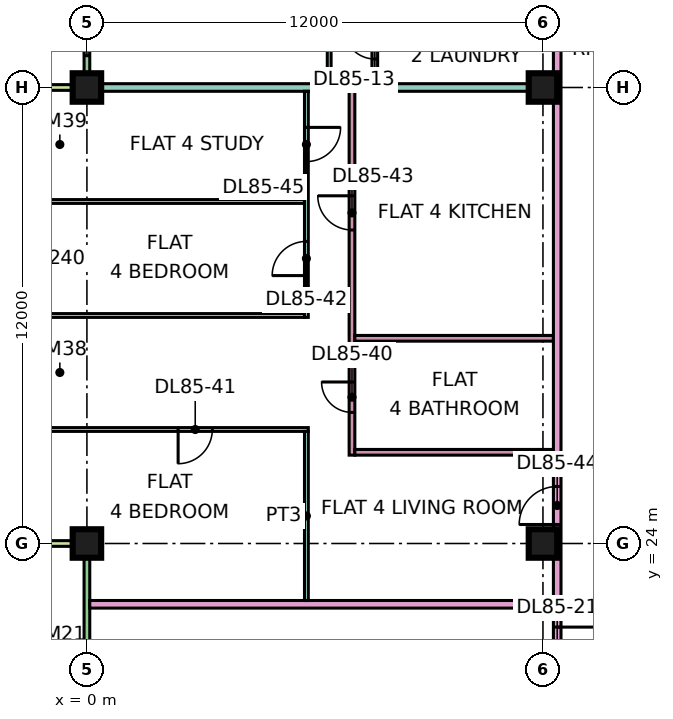
"""IFC4 building model, lengths in metres.
Left out: names, types, materials, properties, quantities, classifications, styles, units other than length and angle.
Written with IfcOpenShell. Run it as: python <this file> out.ifc"""

import sys

from ifc_helpers import new_model, si_unit, direction, frame, frame_2d, origin, origin_2d, place, context, subcontext, project, spatial, rectangle, extrude, element, fill, save


model = new_model("IFC4")
c1 = context("Model", 3, precision=1e-05, world=origin(), true_north=direction((0.0, 1.0)))
c2 = subcontext(c1, "Body", "Model", "MODEL_VIEW")
j1 = project(units=[si_unit("LENGTHUNIT", "METRE"), si_unit("PLANEANGLEUNIT", "RADIAN")], contexts=[c1])
p1 = place(None, origin())
s1 = spatial("IfcSite", under=j1, at=p1, CompositionType="ELEMENT")
p2 = place(p1, origin())
s2 = spatial("IfcBuilding", under=s1, at=p2, CompositionType="ELEMENT")
p3 = place(p2, frame((0.0, 0.0, 365.15)))
s3 = spatial("IfcBuildingStorey", under=s2, at=p3, CompositionType="ELEMENT", Elevation=365.15)
p4 = place(p3, frame((0.0, 24.0, 0.0), z_axis=(0.0, 0.0, 1.0), x_axis=(1.0, 0.0, 0.0)))
e1 = element("IfcColumn", 1, at=p4, inside=s3, PredefinedType="COLUMN", context=c2, shape_type="SweptSolid", body=[
    extrude(rectangle(XDim=0.75, YDim=0.75, at=origin_2d()), origin(), (0.0, 0.0, 1.0), 3.75),
])
p5 = place(p3, frame((0.0, 36.0, 0.0), z_axis=(0.0, 0.0, 1.0), x_axis=(1.0, 0.0, 0.0)))
e2 = element("IfcColumn", 2, at=p5, inside=s3, PredefinedType="COLUMN", context=c2, shape_type="SweptSolid", body=[
    extrude(rectangle(XDim=0.75, YDim=0.75, at=origin_2d()), origin(), (0.0, 0.0, 1.0), 3.75),
])
for number, where, z_axis, x_axis in (
    (3, (12.0, 24.0, 0.0), (0.0, 0.0, 1.0), (1.0, 0.0, 0.0)),
    (4, (12.0, 36.0, 0.0), (0.0, 0.0, 1.0), (1.0, 0.0, 0.0)),
):
    element("IfcColumn", number, at=place(p3, frame(where, z_axis=z_axis, x_axis=x_axis)), inside=s3, PredefinedType="COLUMN", context=c2, shape_type="SweptSolid", body=[
        extrude(rectangle(XDim=0.75, YDim=0.75, at=origin_2d()), origin(), (0.0, 0.0, 1.0), 3.75),
    ])
p6 = place(p3, frame((0.0, 47.925, 0.0), z_axis=(0.0, 0.0, 1.0), x_axis=(0.0, -1.0, 0.0)))
e5 = element("IfcWall", 5, at=p6, inside=s3, PredefinedType="SOLIDWALL", context=c2, shape_type="SweptSolid", body=[
    extrude(rectangle(XDim=11.85, YDim=0.15, at=frame_2d((5.925, 0.0))), origin(), (0.0, 0.0, 1.0), 3.35),
])
p7 = place(p6, frame((0.625, 0.0, 0.0)))
e6 = element("IfcOpeningElement", 6, at=p7, cuts=e5, PredefinedType="OPENING", context=c2, shape_type="SweptSolid", body=[
    extrude(rectangle(XDim=1.2, YDim=2.4, at=frame_2d((0.6, 1.2))), frame((0.0, 0.085, 0.0), z_axis=(0.0, -1.0, 0.0), x_axis=(1.0, 0.0, 0.0)), (0.0, 0.0, 1.0), 0.17),
])
p8 = place(p6, frame((4.663, 0.0, 0.45)))
e7 = element("IfcOpeningElement", 7, at=p8, cuts=e5, PredefinedType="OPENING", context=c2, shape_type="SweptSolid", body=[
    extrude(rectangle(XDim=3.0, YDim=2.4, at=frame_2d((1.5, 1.2))), frame((0.0, 0.085, 0.0), z_axis=(0.0, -1.0, 0.0), x_axis=(1.0, 0.0, 0.0)), (0.0, 0.0, 1.0), 0.17),
])
p9 = place(p6, frame((9.288, 0.0, 0.45)))
e8 = element("IfcOpeningElement", 8, at=p9, cuts=e5, PredefinedType="OPENING", context=c2, shape_type="SweptSolid", body=[
    extrude(rectangle(XDim=1.8, YDim=2.4, at=frame_2d((0.9, 1.2))), frame((0.0, 0.085, 0.0), z_axis=(0.0, -1.0, 0.0), x_axis=(1.0, 0.0, 0.0)), (0.0, 0.0, 1.0), 0.17),
])
p10 = place(p3, frame((-1.5, 36.0, 0.0), z_axis=(0.0, 0.0, 1.0), x_axis=(1.0, 0.0, 0.0)))
e9 = element("IfcWall", 9, at=p10, inside=s3, PredefinedType="SOLIDWALL", context=c2, shape_type="SweptSolid", body=[
    extrude(rectangle(XDim=1.5, YDim=0.15, at=frame_2d((0.75, 0.0))), origin(), (0.0, 0.0, 1.0), 3.35),
])
p11 = place(p3, frame((0.0, 23.925, 0.0), z_axis=(0.0, 0.0, 1.0), x_axis=(0.0, -1.0, 0.0)))
e10 = element("IfcWall", 10, at=p11, inside=s3, PredefinedType="SOLIDWALL", context=c2, shape_type="SweptSolid", body=[
    extrude(rectangle(XDim=11.35, YDim=0.15, at=frame_2d((5.675, 0.0))), origin(), (0.0, 0.0, 1.0), 3.35),
])
p12 = place(p11, frame((6.738, 0.0, 0.0)))
e11 = element("IfcOpeningElement", 11, at=p12, cuts=e10, PredefinedType="OPENING", context=c2, shape_type="SweptSolid", body=[
    extrude(rectangle(XDim=1.8, YDim=2.4, at=frame_2d((0.9, 1.2))), frame((0.0, 0.085, 0.0), z_axis=(0.0, -1.0, 0.0), x_axis=(1.0, 0.0, 0.0)), (0.0, 0.0, 1.0), 0.17),
])
p13 = place(p3, frame((-1.5, 24.0, 0.0), z_axis=(0.0, 0.0, 1.0), x_axis=(1.0, 0.0, 0.0)))
e12 = element("IfcWall", 12, at=p13, inside=s3, PredefinedType="SOLIDWALL", context=c2, shape_type="SweptSolid", body=[
    extrude(rectangle(XDim=1.5, YDim=0.15, at=frame_2d((0.75, 0.0))), origin(), (0.0, 0.0, 1.0), 3.35),
])
p14 = place(p3, frame((-1.35, 27.0, 0.0), z_axis=(0.0, 0.0, 1.0), x_axis=(1.0, 0.0, 0.0)))
e13 = element("IfcWall", 13, at=p14, inside=s3, PredefinedType="PARTITIONING", context=c2, shape_type="SweptSolid", body=[
    extrude(rectangle(XDim=7.175, YDim=0.1, at=frame_2d((3.587, 0.0))), origin(), (0.0, 0.0, 1.0), 3.35),
])
p15 = place(p14, frame((3.75, 0.0, 0.0)))
e14 = element("IfcOpeningElement", 14, at=p15, cuts=e13, PredefinedType="OPENING", context=c2, shape_type="SweptSolid", body=[
    extrude(rectangle(XDim=0.9, YDim=2.1, at=frame_2d((0.45, 1.05))), frame((0.0, 0.06, 0.0), z_axis=(0.0, -1.0, 0.0), x_axis=(1.0, 0.0, 0.0)), (0.0, 0.0, 1.0), 0.12),
])
for number, where, z_axis, x_axis in (
    (15, (-1.35, 30.0, 0.0), (0.0, 0.0, 1.0), (1.0, 0.0, 0.0)),
    (16, (-1.35, 33.0, 0.0), (0.0, 0.0, 1.0), (1.0, 0.0, 0.0)),
):
    element("IfcWall", number, at=place(p3, frame(where, z_axis=z_axis, x_axis=x_axis)), inside=s3, PredefinedType="PARTITIONING", context=c2, shape_type="SweptSolid", body=[
        extrude(rectangle(XDim=7.075, YDim=0.1, at=frame_2d((3.538, 0.0))), origin(), (0.0, 0.0, 1.0), 3.35),
    ])
e17 = element("IfcWall", 17, at=p5, inside=s3, PredefinedType="PARTITIONING", context=c2, shape_type="SweptSolid", body=[
    extrude(rectangle(XDim=12.275, YDim=0.2, at=frame_2d((6.137, 0.0))), origin(), (0.0, 0.0, 1.0), 3.35),
])
p16 = place(p3, frame((0.074, 22.4, 0.0), z_axis=(0.0, 0.0, 1.0), x_axis=(1.0, 0.0, 0.0)))
e18 = element("IfcWall", 18, at=p16, inside=s3, PredefinedType="PARTITIONING", context=c2, shape_type="SweptSolid", body=[
    extrude(rectangle(XDim=12.201, YDim=0.2, at=frame_2d((6.101, 0.0))), origin(), (0.0, 0.0, 1.0), 3.35),
])
p17 = place(p3, frame((5.775, 22.5, 0.0), z_axis=(0.0, 0.0, 1.0), x_axis=(0.0, 1.0, 0.0)))
e19 = element("IfcWall", 19, at=p17, inside=s3, PredefinedType="PARTITIONING", context=c2, shape_type="SweptSolid", body=[
    extrude(rectangle(XDim=4.45, YDim=0.1, at=frame_2d((2.225, 0.0))), origin(), (0.0, 0.0, 1.0), 3.35),
])
p18 = place(p3, frame((5.775, 29.95, 0.0), z_axis=(0.0, 0.0, 1.0), x_axis=(0.0, 1.0, 0.0)))
e20 = element("IfcWall", 20, at=p18, inside=s3, PredefinedType="PARTITIONING", context=c2, shape_type="SweptSolid", body=[
    extrude(rectangle(XDim=5.95, YDim=0.1, at=frame_2d((2.975, 0.0))), origin(), (0.0, 0.0, 1.0), 3.35),
])
p19 = place(p18, frame((1.1, 0.0, 0.0)))
e21 = element("IfcOpeningElement", 21, at=p19, cuts=e20, PredefinedType="OPENING", context=c2, shape_type="SweptSolid", body=[
    extrude(rectangle(XDim=0.9, YDim=2.1, at=frame_2d((0.45, 1.05))), frame((0.0, 0.06, 0.0), z_axis=(0.0, -1.0, 0.0), x_axis=(1.0, 0.0, 0.0)), (0.0, 0.0, 1.0), 0.12),
])
p20 = place(p18, frame((4.1, 0.0, 0.0)))
e22 = element("IfcOpeningElement", 22, at=p20, cuts=e20, PredefinedType="OPENING", context=c2, shape_type="SweptSolid", body=[
    extrude(rectangle(XDim=0.9, YDim=2.1, at=frame_2d((0.45, 1.05))), frame((0.0, 0.06, 0.0), z_axis=(0.0, -1.0, 0.0), x_axis=(1.0, 0.0, 0.0)), (0.0, 0.0, 1.0), 0.12),
])
p21 = place(p3, frame((6.375, 36.1, 0.0), z_axis=(0.0, 0.0, 1.0), x_axis=(0.0, 1.0, 0.0)))
e23 = element("IfcWall", 23, at=p21, inside=s3, PredefinedType="PARTITIONING", context=c2, shape_type="SweptSolid", body=[
    extrude(rectangle(XDim=2.85, YDim=0.1, at=frame_2d((1.425, 0.0))), origin(), (0.0, 0.0, 1.0), 3.35),
])
p22 = place(p21, frame((0.95, 0.0, 0.0)))
e24 = element("IfcOpeningElement", 24, at=p22, cuts=e23, PredefinedType="OPENING", context=c2, shape_type="SweptSolid", body=[
    extrude(rectangle(XDim=0.9, YDim=2.1, at=frame_2d((0.45, 1.05))), frame((0.0, 0.06, 0.0), z_axis=(0.0, -1.0, 0.0), x_axis=(1.0, 0.0, 0.0)), (0.0, 0.0, 1.0), 0.12),
])
p23 = place(p3, frame((6.975, 26.325, 0.0), z_axis=(0.0, 0.0, 1.0), x_axis=(0.0, 1.0, 0.0)))
e25 = element("IfcWall", 25, at=p23, inside=s3, PredefinedType="PARTITIONING", context=c2, shape_type="SweptSolid", body=[
    extrude(rectangle(XDim=9.575, YDim=0.15, at=frame_2d((4.788, 0.0))), origin(), (0.0, 0.0, 1.0), 3.35),
])
p24 = place(p23, frame((1.125, 0.0, 0.0)))
e26 = element("IfcOpeningElement", 26, at=p24, cuts=e25, PredefinedType="OPENING", context=c2, shape_type="SweptSolid", body=[
    extrude(rectangle(XDim=0.8, YDim=2.1, at=frame_2d((0.4, 1.05))), frame((0.0, 0.085, 0.0), z_axis=(0.0, -1.0, 0.0), x_axis=(1.0, 0.0, 0.0)), (0.0, 0.0, 1.0), 0.17),
])
p25 = place(p23, frame((5.925, 0.0, 0.0)))
e27 = element("IfcOpeningElement", 27, at=p25, cuts=e25, PredefinedType="OPENING", context=c2, shape_type="SweptSolid", body=[
    extrude(rectangle(XDim=0.9, YDim=2.1, at=frame_2d((0.45, 1.05))), frame((0.0, 0.085, 0.0), z_axis=(0.0, -1.0, 0.0), x_axis=(1.0, 0.0, 0.0)), (0.0, 0.0, 1.0), 0.17),
])
for number, where, z_axis, x_axis in (
    (28, (7.05, 26.4, 0.0), (0.0, 0.0, 1.0), (1.0, 0.0, 0.0)),
    (29, (7.05, 29.4, 0.0), (0.0, 0.0, 1.0), (1.0, 0.0, 0.0)),
):
    element("IfcWall", number, at=place(p3, frame(where, z_axis=z_axis, x_axis=x_axis)), inside=s3, PredefinedType="PARTITIONING", context=c2, shape_type="SweptSolid", body=[
        extrude(rectangle(XDim=5.225, YDim=0.15, at=frame_2d((2.612, 0.0))), origin(), (0.0, 0.0, 1.0), 3.35),
    ])
p26 = place(p3, frame((7.575, 36.1, 0.0), z_axis=(0.0, 0.0, 1.0), x_axis=(0.0, 1.0, 0.0)))
e30 = element("IfcWall", 30, at=p26, inside=s3, PredefinedType="PARTITIONING", context=c2, shape_type="SweptSolid", body=[
    extrude(rectangle(XDim=12.575, YDim=0.15, at=frame_2d((6.288, 0.0))), origin(), (0.0, 0.0, 1.0), 3.35),
])
p27 = place(p26, frame((0.65, 0.0, 0.0)))
e31 = element("IfcOpeningElement", 31, at=p27, cuts=e30, PredefinedType="OPENING", context=c2, shape_type="SweptSolid", body=[
    extrude(rectangle(XDim=0.8, YDim=2.1, at=frame_2d((0.4, 1.05))), frame((0.0, 0.085, 0.0), z_axis=(0.0, -1.0, 0.0), x_axis=(1.0, 0.0, 0.0)), (0.0, 0.0, 1.0), 0.17),
])
p28 = place(p26, frame((3.65, 0.0, 0.0)))
e32 = element("IfcOpeningElement", 32, at=p28, cuts=e30, PredefinedType="OPENING", context=c2, shape_type="SweptSolid", body=[
    extrude(rectangle(XDim=0.8, YDim=2.1, at=frame_2d((0.4, 1.05))), frame((0.0, 0.085, 0.0), z_axis=(0.0, -1.0, 0.0), x_axis=(1.0, 0.0, 0.0)), (0.0, 0.0, 1.0), 0.17),
])
p29 = place(p26, frame((7.1, 0.0, 0.0)))
e33 = element("IfcOpeningElement", 33, at=p29, cuts=e30, PredefinedType="OPENING", context=c2, shape_type="SweptSolid", body=[
    extrude(rectangle(XDim=0.8, YDim=2.1, at=frame_2d((0.4, 1.05))), frame((0.0, 0.085, 0.0), z_axis=(0.0, -1.0, 0.0), x_axis=(1.0, 0.0, 0.0)), (0.0, 0.0, 1.0), 0.17),
])
p30 = place(p3, frame((12.375, 20.0, 0.0), z_axis=(0.0, 0.0, 1.0), x_axis=(0.0, 1.0, 0.0)))
e34 = element("IfcWall", 34, at=p30, inside=s3, PredefinedType="PARTITIONING", context=c2, shape_type="SweptSolid", body=[
    extrude(rectangle(XDim=33.926, YDim=0.2, at=frame_2d((16.963, 0.0))), origin(), (0.0, 0.0, 1.0), 3.35),
])
p31 = place(p30, frame((29.4, 0.0, 0.0)))
e35 = element("IfcOpeningElement", 35, at=p31, cuts=e34, PredefinedType="OPENING", context=c2, shape_type="SweptSolid", body=[
    extrude(rectangle(XDim=1.0, YDim=2.1, at=frame_2d((0.5, 1.05))), frame((0.0, 0.11, 0.0), z_axis=(0.0, -1.0, 0.0), x_axis=(1.0, 0.0, 0.0)), (0.0, 0.0, 1.0), 0.22),
])
p32 = place(p30, frame((0.6, 0.0, 0.0)))
e36 = element("IfcOpeningElement", 36, at=p32, cuts=e34, PredefinedType="OPENING", context=c2, shape_type="SweptSolid", body=[
    extrude(rectangle(XDim=1.2, YDim=2.1, at=frame_2d((0.6, 1.05))), frame((0.0, 0.11, 0.0), z_axis=(0.0, -1.0, 0.0), x_axis=(1.0, 0.0, 0.0)), (0.0, 0.0, 1.0), 0.22),
])
p33 = place(p30, frame((4.5, 0.0, 0.0)))
e37 = element("IfcOpeningElement", 37, at=p33, cuts=e34, PredefinedType="OPENING", context=c2, shape_type="SweptSolid", body=[
    extrude(rectangle(XDim=1.0, YDim=2.1, at=frame_2d((0.5, 1.05))), frame((0.0, 0.11, 0.0), z_axis=(0.0, -1.0, 0.0), x_axis=(1.0, 0.0, 0.0)), (0.0, 0.0, 1.0), 0.22),
])
p34 = place(p9, origin())
e38 = element("IfcWindow", 38, at=p34, inside=s3, PartitioningType="SINGLE_PANEL", PredefinedType="WINDOW", context=c2, shape_type="SweptSolid", body=[
    extrude(rectangle(XDim=1.8, YDim=2.4, at=frame_2d((0.9, 1.2))), frame((0.0, 0.03, 0.0), z_axis=(0.0, -1.0, 0.0), x_axis=(1.0, 0.0, 0.0)), (0.0, 0.0, 1.0), 0.06),
])
fill(e8, e38)
p35 = place(p27, frame((0.8, 0.0, 0.0), z_axis=(0.0, 0.0, 1.0), x_axis=(-1.0, 0.0, 0.0)))
e39 = element("IfcDoor", 39, at=p35, inside=s3, OperationType="SINGLE_SWING_RIGHT", PredefinedType="DOOR", context=c2, shape_type="SweptSolid", body=[
    extrude(rectangle(XDim=0.8, YDim=2.1, at=frame_2d((0.4, 1.05))), frame((0.0, 0.025, 0.0), z_axis=(0.0, -1.0, 0.0), x_axis=(1.0, 0.0, 0.0)), (0.0, 0.0, 1.0), 0.05),
])
fill(e31, e39)
p36 = place(p32, origin())
e40 = element("IfcDoor", 40, at=p36, inside=s3, OperationType="SINGLE_SWING_RIGHT", PredefinedType="DOOR", context=c2, shape_type="SweptSolid", body=[
    extrude(rectangle(XDim=1.2, YDim=2.1, at=frame_2d((0.6, 1.05))), frame((0.0, 0.025, 0.0), z_axis=(0.0, -1.0, 0.0), x_axis=(1.0, 0.0, 0.0)), (0.0, 0.0, 1.0), 0.05),
])
fill(e36, e40)
p37 = place(p24, frame((0.8, 0.0, 0.0), z_axis=(0.0, 0.0, 1.0), x_axis=(-1.0, 0.0, 0.0)))
e41 = element("IfcDoor", 41, at=p37, inside=s3, OperationType="SINGLE_SWING_RIGHT", PredefinedType="DOOR", context=c2, shape_type="SweptSolid", body=[
    extrude(rectangle(XDim=0.8, YDim=2.1, at=frame_2d((0.4, 1.05))), frame((0.0, 0.025, 0.0), z_axis=(0.0, -1.0, 0.0), x_axis=(1.0, 0.0, 0.0)), (0.0, 0.0, 1.0), 0.05),
])
fill(e26, e41)
p38 = place(p15, frame((0.9, 0.0, 0.0), z_axis=(0.0, 0.0, 1.0), x_axis=(-1.0, 0.0, 0.0)))
e42 = element("IfcDoor", 42, at=p38, inside=s3, OperationType="SINGLE_SWING_LEFT", PredefinedType="DOOR", context=c2, shape_type="SweptSolid", body=[
    extrude(rectangle(XDim=0.9, YDim=2.1, at=frame_2d((0.45, 1.05))), frame((0.0, 0.025, 0.0), z_axis=(0.0, -1.0, 0.0), x_axis=(1.0, 0.0, 0.0)), (0.0, 0.0, 1.0), 0.05),
])
fill(e14, e42)
p39 = place(p19, origin())
e43 = element("IfcDoor", 43, at=p39, inside=s3, OperationType="SINGLE_SWING_LEFT", PredefinedType="DOOR", context=c2, shape_type="SweptSolid", body=[
    extrude(rectangle(XDim=0.9, YDim=2.1, at=frame_2d((0.45, 1.05))), frame((0.0, 0.025, 0.0), z_axis=(0.0, -1.0, 0.0), x_axis=(1.0, 0.0, 0.0)), (0.0, 0.0, 1.0), 0.05),
])
fill(e21, e43)
p40 = place(p25, frame((0.9, 0.0, 0.0), z_axis=(0.0, 0.0, 1.0), x_axis=(-1.0, 0.0, 0.0)))
e44 = element("IfcDoor", 44, at=p40, inside=s3, OperationType="SINGLE_SWING_RIGHT", PredefinedType="DOOR", context=c2, shape_type="SweptSolid", body=[
    extrude(rectangle(XDim=0.9, YDim=2.1, at=frame_2d((0.45, 1.05))), frame((0.0, 0.025, 0.0), z_axis=(0.0, -1.0, 0.0), x_axis=(1.0, 0.0, 0.0)), (0.0, 0.0, 1.0), 0.05),
])
fill(e27, e44)
p41 = place(p33, origin())
e45 = element("IfcDoor", 45, at=p41, inside=s3, OperationType="SINGLE_SWING_LEFT", PredefinedType="DOOR", context=c2, shape_type="SweptSolid", body=[
    extrude(rectangle(XDim=1.0, YDim=2.1, at=frame_2d((0.5, 1.05))), frame((0.0, 0.025, 0.0), z_axis=(0.0, -1.0, 0.0), x_axis=(1.0, 0.0, 0.0)), (0.0, 0.0, 1.0), 0.05),
])
fill(e37, e45)
p42 = place(p20, origin())
e46 = element("IfcDoor", 46, at=p42, inside=s3, OperationType="SINGLE_SWING_RIGHT", PredefinedType="DOOR", context=c2, shape_type="SweptSolid", body=[
    extrude(rectangle(XDim=0.9, YDim=2.1, at=frame_2d((0.45, 1.05))), frame((0.0, 0.025, 0.0), z_axis=(0.0, -1.0, 0.0), x_axis=(1.0, 0.0, 0.0)), (0.0, 0.0, 1.0), 0.05),
])
fill(e22, e46)
save(model, sys.argv[1])
